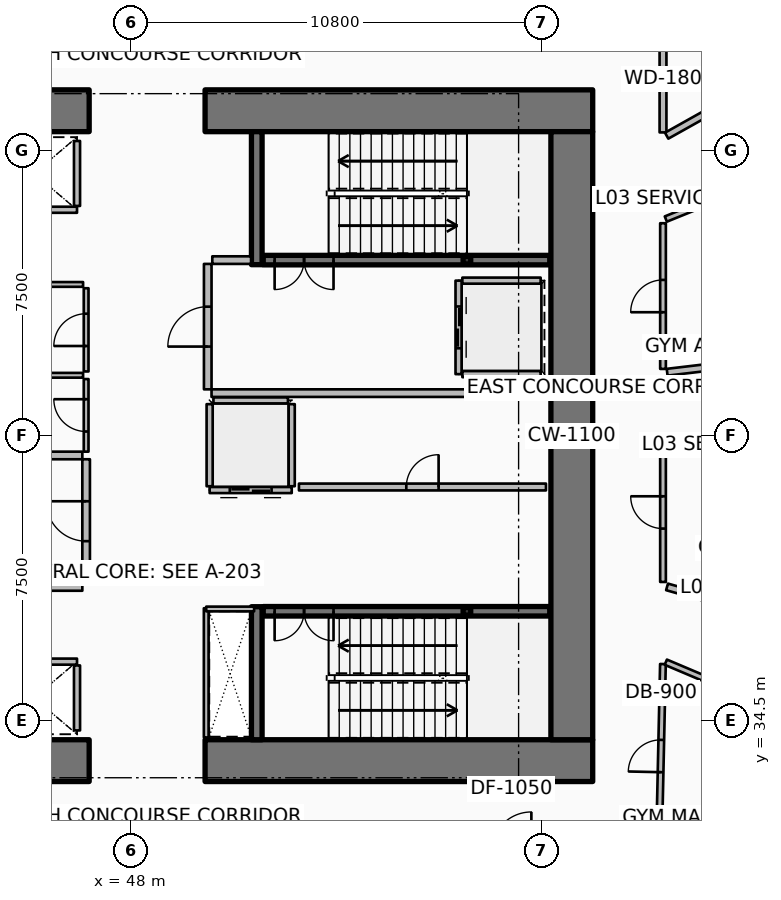
"""IFC4 building model, lengths in metres.
Left out: names, types, materials, properties, quantities, classifications, styles, units other than length and angle.
Written with IfcOpenShell. Run it as: python <this file> out.ifc"""

import sys

from ifc_helpers import new_model, si_unit, direction, frame, frame_2d, origin, origin_2d, place, context, subcontext, project, spatial, rectangle, hollow_rectangle, extrude, element, fill, save


model = new_model("IFC4")
c1 = context("Model", 3, precision=1e-05, world=origin(), true_north=direction((0.0, 1.0)))
c2 = subcontext(c1, "Body", "Model", "MODEL_VIEW")
j1 = project(units=[si_unit("LENGTHUNIT", "METRE"), si_unit("PLANEANGLEUNIT", "RADIAN")], contexts=[c1])
p1 = place(None, origin())
s1 = spatial("IfcSite", under=j1, at=p1, CompositionType="ELEMENT")
p2 = place(p1, origin())
s2 = spatial("IfcBuilding", under=s1, at=p2, CompositionType="ELEMENT")
p3 = place(p2, frame((0.0, 0.0, 16.8)))
s3 = spatial("IfcBuildingStorey", under=s2, at=p3, CompositionType="ELEMENT", Elevation=16.8)
for number, where, z_axis, x_axis in (
    (1, (36.7, 33.45, 0.0), (0.0, 0.0, 1.0), (1.0, 0.0, 0.0)),
    (2, (49.95, 33.45, 0.0), (0.0, 0.0, 1.0), (1.0, 0.0, 0.0)),
    (3, (36.7, 50.55, 0.0), (0.0, 0.0, 1.0), (1.0, 0.0, 0.0)),
    (4, (49.95, 50.55, 0.0), (0.0, 0.0, 1.0), (1.0, 0.0, 0.0)),
):
    element("IfcWall", number, at=place(p3, frame(where, z_axis=z_axis, x_axis=x_axis)), inside=s3, PredefinedType="SHEAR", context=c2, shape_type="SweptSolid", body=[
        extrude(rectangle(XDim=10.2, YDim=1.1, at=frame_2d((5.1, 0.0))), origin(), (0.0, 0.0, 1.0), 4.8),
    ])
p4 = place(p3, frame((59.6, 34.0, 0.0), z_axis=(0.0, 0.0, 1.0), x_axis=(0.0, 1.0, 0.0)))
e5 = element("IfcWall", 5, at=p4, inside=s3, PredefinedType="SHEAR", context=c2, shape_type="SweptSolid", body=[
    extrude(rectangle(XDim=16.0, YDim=1.1, at=frame_2d((8.0, 0.0))), origin(), (0.0, 0.0, 1.0), 4.8),
])
for number, where, z_axis, x_axis in (
    (6, (51.31, 46.5, 0.0), (0.0, 0.0, 1.0), (0.0, 1.0, 0.0)),
    (7, (51.31, 34.0, 0.0), (0.0, 0.0, 1.0), (0.0, 1.0, 0.0)),
):
    element("IfcWall", number, at=place(p3, frame(where, z_axis=z_axis, x_axis=x_axis)), inside=s3, PredefinedType="SHEAR", context=c2, shape_type="SweptSolid", body=[
        extrude(rectangle(XDim=3.5, YDim=0.28, at=frame_2d((1.75, 0.0))), origin(), (0.0, 0.0, 1.0), 4.8),
    ])
for number, where, z_axis, x_axis in (
    (8, (56.84, 46.62, 0.0), (0.0, 0.0, 1.0), (1.0, 0.0, 0.0)),
    (9, (56.84, 37.38, 0.0), (0.0, 0.0, 1.0), (1.0, 0.0, 0.0)),
):
    element("IfcColumn", number, at=place(p3, frame(where, z_axis=z_axis, x_axis=x_axis)), inside=s3, PredefinedType="COLUMN", context=c2, shape_type="SweptSolid", body=[
        extrude(hollow_rectangle(XDim=0.2, YDim=0.2, WallThickness=0.01, InnerFilletRadius=0.01, OuterFilletRadius=0.02, at=origin_2d()), origin(), (0.0, 0.0, 1.0), 2.195),
    ])
p5 = place(p3, frame((51.48, 46.62, 0.0), z_axis=(0.0, 0.0, 1.0), x_axis=(1.0, 0.0, 0.0)))
e10 = element("IfcWall", 10, at=p5, inside=s3, PredefinedType="SOLIDWALL", context=c2, shape_type="SweptSolid", body=[
    extrude(rectangle(XDim=7.54, YDim=0.25, at=frame_2d((3.77, 0.0))), origin(), (0.0, 0.0, 1.0), 4.4),
])
p6 = place(p5, frame((0.3, 0.0, 0.0)))
e11 = element("IfcOpeningElement", 11, at=p6, cuts=e10, PredefinedType="OPENING", context=c2, shape_type="SweptSolid", body=[
    extrude(rectangle(XDim=1.55, YDim=2.15, at=frame_2d((0.775, 1.075))), frame((0.0, 0.135, 0.0), z_axis=(0.0, -1.0, 0.0), x_axis=(1.0, 0.0, 0.0)), (0.0, 0.0, 1.0), 0.27),
])
p7 = place(p3, frame((51.48, 37.38, 0.0), z_axis=(0.0, 0.0, 1.0), x_axis=(1.0, 0.0, 0.0)))
e12 = element("IfcWall", 12, at=p7, inside=s3, PredefinedType="SOLIDWALL", context=c2, shape_type="SweptSolid", body=[
    extrude(rectangle(XDim=7.54, YDim=0.25, at=frame_2d((3.77, 0.0))), origin(), (0.0, 0.0, 1.0), 4.4),
])
p8 = place(p7, frame((0.3, 0.0, 0.0)))
e13 = element("IfcOpeningElement", 13, at=p8, cuts=e12, PredefinedType="OPENING", context=c2, shape_type="SweptSolid", body=[
    extrude(rectangle(XDim=1.55, YDim=2.15, at=frame_2d((0.775, 1.075))), frame((0.0, 0.135, 0.0), z_axis=(0.0, -1.0, 0.0), x_axis=(1.0, 0.0, 0.0)), (0.0, 0.0, 1.0), 0.27),
])
p9 = place(p3, frame((46.58, 47.945, 0.0), z_axis=(0.0, 0.0, 1.0), x_axis=(-1.0, 0.0, 0.0)))
e14 = element("IfcWall", 14, at=p9, inside=s3, PredefinedType="PARTITIONING", context=c2, shape_type="SweptSolid", body=[
    extrude(rectangle(XDim=2.26, YDim=0.16, at=frame_2d((1.13, 0.0))), origin(), (0.0, 0.0, 1.0), 4.4),
])
p10 = place(p3, frame((46.58, 48.045, 0.0), z_axis=(0.0, 0.0, 1.0), x_axis=(0.0, 1.0, 0.0)))
e15 = element("IfcWall", 15, at=p10, inside=s3, PredefinedType="PARTITIONING", context=c2, shape_type="SweptSolid", body=[
    extrude(rectangle(XDim=1.71, YDim=0.16, at=frame_2d((0.855, 0.0))), origin(), (0.0, 0.0, 1.0), 4.4),
])
p11 = place(p3, frame((44.32, 36.055, 0.0), z_axis=(0.0, 0.0, 1.0), x_axis=(1.0, 0.0, 0.0)))
e16 = element("IfcWall", 16, at=p11, inside=s3, PredefinedType="PARTITIONING", context=c2, shape_type="SweptSolid", body=[
    extrude(rectangle(XDim=2.26, YDim=0.16, at=frame_2d((1.13, 0.0))), origin(), (0.0, 0.0, 1.0), 4.4),
])
p12 = place(p3, frame((46.58, 34.245, 0.0), z_axis=(0.0, 0.0, 1.0), x_axis=(0.0, 1.0, 0.0)))
e17 = element("IfcWall", 17, at=p12, inside=s3, PredefinedType="PARTITIONING", context=c2, shape_type="SweptSolid", body=[
    extrude(rectangle(XDim=1.71, YDim=0.16, at=frame_2d((0.855, 0.0))), origin(), (0.0, 0.0, 1.0), 4.4),
])
p13 = place(p3, frame((56.62, 46.08, 0.0), z_axis=(0.0, 0.0, 1.0), x_axis=(0.0, -1.0, 0.0)))
e18 = element("IfcWall", 18, at=p13, inside=s3, PredefinedType="PARTITIONING", context=c2, shape_type="SweptSolid", body=[
    extrude(rectangle(XDim=2.46, YDim=0.16, at=frame_2d((1.23, 0.0))), origin(), (0.0, 0.0, 1.0), 4.4),
])
p14 = place(p13, frame((0.68, 0.0, 0.0)))
e19 = element("IfcOpeningElement", 19, at=p14, cuts=e18, PredefinedType="OPENING", context=c2, shape_type="SweptSolid", body=[
    extrude(rectangle(XDim=1.1, YDim=2.1, at=frame_2d((0.55, 1.05))), frame((0.0, 0.09, 0.0), z_axis=(0.0, -1.0, 0.0), x_axis=(1.0, 0.0, 0.0)), (0.0, 0.0, 1.0), 0.18),
])
for number, where, z_axis, x_axis in (
    (20, (56.72, 46.08, 0.0), (0.0, 0.0, 1.0), (1.0, 0.0, 0.0)),
    (21, (56.72, 43.62, 0.0), (0.0, 0.0, 1.0), (1.0, 0.0, 0.0)),
):
    element("IfcWall", number, at=place(p3, frame(where, z_axis=z_axis, x_axis=x_axis)), inside=s3, PredefinedType="PARTITIONING", context=c2, shape_type="SweptSolid", body=[
        extrude(rectangle(XDim=2.06, YDim=0.16, at=frame_2d((1.03, 0.0))), origin(), (0.0, 0.0, 1.0), 4.4),
    ])
p15 = place(p3, frame((52.23, 40.57, 0.0), z_axis=(0.0, 0.0, 1.0), x_axis=(-1.0, 0.0, 0.0)))
e22 = element("IfcWall", 22, at=p15, inside=s3, PredefinedType="PARTITIONING", context=c2, shape_type="SweptSolid", body=[
    extrude(rectangle(XDim=2.16, YDim=0.16, at=frame_2d((1.08, 0.0))), origin(), (0.0, 0.0, 1.0), 4.4),
])
p16 = place(p15, frame((0.53, 0.0, 0.0)))
e23 = element("IfcOpeningElement", 23, at=p16, cuts=e22, PredefinedType="OPENING", context=c2, shape_type="SweptSolid", body=[
    extrude(rectangle(XDim=1.1, YDim=2.1, at=frame_2d((0.55, 1.05))), frame((0.0, 0.09, 0.0), z_axis=(0.0, -1.0, 0.0), x_axis=(1.0, 0.0, 0.0)), (0.0, 0.0, 1.0), 0.18),
])
for number, where, z_axis, x_axis in (
    (24, (52.23, 40.67, 0.0), (0.0, 0.0, 1.0), (0.0, 1.0, 0.0)),
    (25, (50.07, 40.67, 0.0), (0.0, 0.0, 1.0), (0.0, 1.0, 0.0)),
):
    element("IfcWall", number, at=place(p3, frame(where, z_axis=z_axis, x_axis=x_axis)), inside=s3, PredefinedType="PARTITIONING", context=c2, shape_type="SweptSolid", body=[
        extrude(rectangle(XDim=2.16, YDim=0.16, at=frame_2d((1.08, 0.0))), origin(), (0.0, 0.0, 1.0), 4.4),
    ])
p17 = place(p3, frame((50.17, 42.93, 0.0), z_axis=(0.0, 0.0, 1.0), x_axis=(1.0, 0.0, 0.0)))
e26 = element("IfcWall", 26, at=p17, inside=s3, PredefinedType="PARTITIONING", context=c2, shape_type="SweptSolid", body=[
    extrude(rectangle(XDim=1.96, YDim=0.16, at=frame_2d((0.98, 0.0))), origin(), (0.0, 0.0, 1.0), 4.4),
])
p18 = place(p3, frame((52.42, 40.65, 0.0), z_axis=(0.0, 0.0, 1.0), x_axis=(1.0, 0.0, 0.0)))
e27 = element("IfcWall", 27, at=p18, inside=s3, PredefinedType="PARTITIONING", context=c2, shape_type="SweptSolid", body=[
    extrude(rectangle(XDim=6.5, YDim=0.18, at=frame_2d((3.25, 0.0))), origin(), (0.0, 0.0, 1.0), 4.4),
])
p19 = place(p18, frame((2.825, 0.0, 0.0)))
e28 = element("IfcOpeningElement", 28, at=p19, cuts=e27, PredefinedType="OPENING", context=c2, shape_type="SweptSolid", body=[
    extrude(rectangle(XDim=0.85, YDim=2.06, at=frame_2d((0.425, 1.03))), frame((0.0, 0.1, 0.0), z_axis=(0.0, -1.0, 0.0), x_axis=(1.0, 0.0, 0.0)), (0.0, 0.0, 1.0), 0.2),
])
p20 = place(p3, frame((41.35, 38.02, 0.0), z_axis=(0.0, 0.0, 1.0), x_axis=(1.0, 0.0, 0.0)))
e29 = element("IfcWall", 29, at=p20, inside=s3, PredefinedType="PARTITIONING", context=c2, shape_type="SweptSolid", body=[
    extrude(rectangle(XDim=5.37, YDim=0.2, at=frame_2d((2.685, 0.0))), origin(), (0.0, 0.0, 1.0), 4.4),
])
p21 = place(p3, frame((43.92, 41.48, 0.0), z_axis=(0.0, 0.0, 1.0), x_axis=(1.0, 0.0, 0.0)))
e30 = element("IfcWall", 30, at=p21, inside=s3, PredefinedType="PARTITIONING", context=c2, shape_type="SweptSolid", body=[
    extrude(rectangle(XDim=2.8, YDim=0.2, at=frame_2d((1.4, 0.0))), origin(), (0.0, 0.0, 1.0), 4.4),
])
p22 = place(p3, frame((46.82, 38.12, 0.0), z_axis=(0.0, 0.0, 1.0), x_axis=(0.0, 1.0, 0.0)))
e31 = element("IfcWall", 31, at=p22, inside=s3, PredefinedType="PARTITIONING", context=c2, shape_type="SweptSolid", body=[
    extrude(rectangle(XDim=3.26, YDim=0.2, at=frame_2d((1.63, 0.0))), origin(), (0.0, 0.0, 1.0), 4.4),
])
p23 = place(p22, frame((1.105, 0.0, 0.0)))
e32 = element("IfcOpeningElement", 32, at=p23, cuts=e31, PredefinedType="OPENING", context=c2, shape_type="SweptSolid", body=[
    extrude(rectangle(XDim=1.05, YDim=2.1, at=frame_2d((0.525, 1.05))), frame((0.0, 0.11, 0.0), z_axis=(0.0, -1.0, 0.0), x_axis=(1.0, 0.0, 0.0)), (0.0, 0.0, 1.0), 0.22),
])
p24 = place(p3, frame((50.12, 43.12, 0.0), z_axis=(0.0, 0.0, 1.0), x_axis=(1.0, 0.0, 0.0)))
e33 = element("IfcWall", 33, at=p24, inside=s3, PredefinedType="PARTITIONING", context=c2, shape_type="SweptSolid", body=[
    extrude(rectangle(XDim=8.88, YDim=0.2, at=frame_2d((4.44, 0.0))), origin(), (0.0, 0.0, 1.0), 4.4),
])
p25 = place(p3, frame((50.14, 46.62, 0.0), z_axis=(0.0, 0.0, 1.0), x_axis=(1.0, 0.0, 0.0)))
e34 = element("IfcWall", 34, at=p25, inside=s3, PredefinedType="PARTITIONING", context=c2, shape_type="SweptSolid", body=[
    extrude(rectangle(XDim=1.02, YDim=0.2, at=frame_2d((0.51, 0.0))), origin(), (0.0, 0.0, 1.0), 4.4),
])
p26 = place(p3, frame((50.02, 43.22, 0.0), z_axis=(0.0, 0.0, 1.0), x_axis=(0.0, 1.0, 0.0)))
e35 = element("IfcWall", 35, at=p26, inside=s3, PredefinedType="PARTITIONING", context=c2, shape_type="SweptSolid", body=[
    extrude(rectangle(XDim=3.3, YDim=0.2, at=frame_2d((1.65, 0.0))), origin(), (0.0, 0.0, 1.0), 4.4),
])
p27 = place(p26, frame((1.125, 0.0, 0.0)))
e36 = element("IfcOpeningElement", 36, at=p27, cuts=e35, PredefinedType="OPENING", context=c2, shape_type="SweptSolid", body=[
    extrude(rectangle(XDim=1.05, YDim=2.1, at=frame_2d((0.525, 1.05))), frame((0.0, 0.11, 0.0), z_axis=(0.0, -1.0, 0.0), x_axis=(1.0, 0.0, 0.0)), (0.0, 0.0, 1.0), 0.22),
])
p28 = place(p3, frame((49.98, 34.06, 0.0), z_axis=(0.0, 0.0, 1.0), x_axis=(0.0, 1.0, 0.0)))
e37 = element("IfcWall", 37, at=p28, inside=s3, PredefinedType="PARTITIONING", context=c2, shape_type="SweptSolid", body=[
    extrude(rectangle(XDim=3.4, YDim=0.125, at=frame_2d((1.7, 0.0))), origin(), (0.0, 0.0, 1.0), 3.84),
])
p29 = place(p3, frame((49.98, 37.44, 0.0), z_axis=(0.0, 0.0, 1.0), x_axis=(1.0, 0.0, 0.0)))
e38 = element("IfcWall", 38, at=p29, inside=s3, PredefinedType="PARTITIONING", context=c2, shape_type="SweptSolid", body=[
    extrude(rectangle(XDim=1.26, YDim=0.125, at=frame_2d((0.63, 0.0))), origin(), (0.0, 0.0, 1.0), 3.84),
])
p30 = place(p3, frame((44.03, 43.59, 0.0), z_axis=(0.0, 0.0, 1.0), x_axis=(1.0, 0.0, 0.0)))
e39 = element("IfcWall", 39, at=p30, inside=s3, PredefinedType="PARTITIONING", context=c2, shape_type="SweptSolid", body=[
    extrude(rectangle(XDim=2.71, YDim=0.125, at=frame_2d((1.355, 0.0))), origin(), (0.0, 0.0, 1.0), 3.84),
])
p31 = place(p3, frame((46.82, 41.58, 0.0), z_axis=(0.0, 0.0, 1.0), x_axis=(0.0, 1.0, 0.0)))
e40 = element("IfcWall", 40, at=p31, inside=s3, PredefinedType="PARTITIONING", context=c2, shape_type="SweptSolid", body=[
    extrude(rectangle(XDim=1.91, YDim=0.125, at=frame_2d((0.955, 0.0))), origin(), (0.0, 0.0, 1.0), 3.84),
])
p32 = place(p31, frame((0.53, 0.0, 0.0)))
e41 = element("IfcOpeningElement", 41, at=p32, cuts=e40, PredefinedType="OPENING", context=c2, shape_type="SweptSolid", body=[
    extrude(rectangle(XDim=0.85, YDim=2.06, at=frame_2d((0.425, 1.03))), frame((0.0, 0.073, 0.0), z_axis=(0.0, -1.0, 0.0), x_axis=(1.0, 0.0, 0.0)), (0.0, 0.0, 1.0), 0.145),
])
p33 = place(p3, frame((46.82, 43.69, 0.0), z_axis=(0.0, 0.0, 1.0), x_axis=(0.0, 1.0, 0.0)))
e42 = element("IfcWall", 42, at=p33, inside=s3, PredefinedType="PARTITIONING", context=c2, shape_type="SweptSolid", body=[
    extrude(rectangle(XDim=2.19, YDim=0.125, at=frame_2d((1.095, 0.0))), origin(), (0.0, 0.0, 1.0), 3.84),
])
p34 = place(p33, frame((0.67, 0.0, 0.0)))
e43 = element("IfcOpeningElement", 43, at=p34, cuts=e42, PredefinedType="OPENING", context=c2, shape_type="SweptSolid", body=[
    extrude(rectangle(XDim=0.85, YDim=2.06, at=frame_2d((0.425, 1.03))), frame((0.0, 0.073, 0.0), z_axis=(0.0, -1.0, 0.0), x_axis=(1.0, 0.0, 0.0)), (0.0, 0.0, 1.0), 0.145),
])
p35 = place(p3, frame((45.48, 45.98, 0.0), z_axis=(0.0, 0.0, 1.0), x_axis=(1.0, 0.0, 0.0)))
e44 = element("IfcWall", 44, at=p35, inside=s3, PredefinedType="PARTITIONING", context=c2, shape_type="SweptSolid", body=[
    extrude(rectangle(XDim=1.26, YDim=0.125, at=frame_2d((0.63, 0.0))), origin(), (0.0, 0.0, 1.0), 3.84),
])
p36 = place(p3, frame((62.0, 49.98, 0.0), z_axis=(0.0, 0.0, 1.0), x_axis=(0.0, 1.0, 0.0)))
e45 = element("IfcWall", 45, at=p36, inside=s3, PredefinedType="PARTITIONING", context=c2, shape_type="SweptSolid", body=[
    extrude(rectangle(XDim=2.83, YDim=0.18, at=frame_2d((1.415, 0.0))), origin(), (0.0, 0.0, 1.0), 3.613),
])
p37 = place(p3, frame((62.096, 49.894, 0.0), z_axis=(0.0, 0.0, 1.0), x_axis=(0.872490608205, 0.488630881744, 0.0)))
e46 = element("IfcWall", 46, at=p37, inside=s3, PredefinedType="PARTITIONING", context=c2, shape_type="SweptSolid", body=[
    extrude(rectangle(XDim=19.185, YDim=0.18, at=frame_2d((9.592, 0.0))), origin(), (0.0, 0.0, 1.0), 3.613),
])
p38 = place(p3, frame((61.892, 31.15, 0.0), z_axis=(0.0, 0.0, 1.0), x_axis=(0.021928973177, 0.999759531155, 0.0)))
e47 = element("IfcWall", 47, at=p38, inside=s3, PredefinedType="PARTITIONING", context=c2, shape_type="SweptSolid", body=[
    extrude(rectangle(XDim=4.843, YDim=0.15, at=frame_2d((2.421, 0.0))), origin(), (0.0, 0.0, 1.0), 3.613),
])
p39 = place(p38, frame((1.997, 0.0, 0.0)))
e48 = element("IfcOpeningElement", 48, at=p39, cuts=e47, PredefinedType="OPENING", context=c2, shape_type="SweptSolid", body=[
    extrude(rectangle(XDim=0.85, YDim=2.06, at=frame_2d((0.425, 1.03))), frame((0.0, 0.085, 0.0), z_axis=(0.0, -1.0, 0.0), x_axis=(1.0, 0.0, 0.0)), (0.0, 0.0, 1.0), 0.17),
])
p40 = place(p3, frame((62.074, 36.041, 0.0), z_axis=(0.0, 0.0, 1.0), x_axis=(0.920841540816, -0.38993699069, 0.0)))
e49 = element("IfcWall", 49, at=p40, inside=s3, PredefinedType="PARTITIONING", context=c2, shape_type="SweptSolid", body=[
    extrude(rectangle(XDim=5.443, YDim=0.15, at=frame_2d((2.722, 0.0))), origin(), (0.0, 0.0, 1.0), 3.84),
])
p41 = place(p3, frame((62.106, 38.022, 0.0), z_axis=(0.0, 0.0, 1.0), x_axis=(0.962455233657, -0.271440459782, 0.0)))
e50 = element("IfcWall", 50, at=p41, inside=s3, PredefinedType="PARTITIONING", context=c2, shape_type="SweptSolid", body=[
    extrude(rectangle(XDim=19.716, YDim=0.18, at=frame_2d((9.858, 0.0))), origin(), (0.0, 0.0, 1.0), 3.613),
])
p42 = place(p3, frame((62.0, 38.152, 0.0), z_axis=(0.0, 0.0, 1.0), x_axis=(0.0, 1.0, 0.0)))
e51 = element("IfcWall", 51, at=p42, inside=s3, PredefinedType="PARTITIONING", context=c2, shape_type="SweptSolid", body=[
    extrude(rectangle(XDim=3.658, YDim=0.15, at=frame_2d((1.829, 0.0))), origin(), (0.0, 0.0, 1.0), 3.613),
])
p43 = place(p42, frame((1.404, 0.0, 0.0)))
e52 = element("IfcOpeningElement", 52, at=p43, cuts=e51, PredefinedType="OPENING", context=c2, shape_type="SweptSolid", body=[
    extrude(rectangle(XDim=0.85, YDim=2.06, at=frame_2d((0.425, 1.03))), frame((0.0, 0.085, 0.0), z_axis=(0.0, -1.0, 0.0), x_axis=(1.0, 0.0, 0.0)), (0.0, 0.0, 1.0), 0.17),
])
p44 = place(p3, frame((62.08, 41.889, 0.0), z_axis=(0.0, 0.0, 1.0), x_axis=(0.999969031596, -0.007869933178, 0.0)))
e53 = element("IfcWall", 53, at=p44, inside=s3, PredefinedType="PARTITIONING", context=c2, shape_type="SweptSolid", body=[
    extrude(rectangle(XDim=3.505, YDim=0.15, at=frame_2d((1.753, 0.0))), origin(), (0.0, 0.0, 1.0), 3.84),
])
p45 = place(p3, frame((62.109, 43.67, 0.0), z_axis=(0.0, 0.0, 1.0), x_axis=(0.993068665713, 0.117535633659, 0.0)))
e54 = element("IfcWall", 54, at=p45, inside=s3, PredefinedType="PARTITIONING", context=c2, shape_type="SweptSolid", body=[
    extrude(rectangle(XDim=21.133, YDim=0.18, at=frame_2d((10.566, 0.0))), origin(), (0.0, 0.0, 1.0), 3.613),
])
p46 = place(p3, frame((62.0, 43.757, 0.0), z_axis=(0.0, 0.0, 1.0), x_axis=(0.0, 1.0, 0.0)))
e55 = element("IfcWall", 55, at=p46, inside=s3, PredefinedType="PARTITIONING", context=c2, shape_type="SweptSolid", body=[
    extrude(rectangle(XDim=3.833, YDim=0.15, at=frame_2d((1.917, 0.0))), origin(), (0.0, 0.0, 1.0), 3.613),
])
p47 = place(p46, frame((1.492, 0.0, 0.0)))
e56 = element("IfcOpeningElement", 56, at=p47, cuts=e55, PredefinedType="OPENING", context=c2, shape_type="SweptSolid", body=[
    extrude(rectangle(XDim=0.85, YDim=2.06, at=frame_2d((0.425, 1.03))), frame((0.0, 0.085, 0.0), z_axis=(0.0, -1.0, 0.0), x_axis=(1.0, 0.0, 0.0)), (0.0, 0.0, 1.0), 0.17),
])
p48 = place(p3, frame((62.074, 47.701, 0.0), z_axis=(0.0, 0.0, 1.0), x_axis=(0.926852538468, 0.375425587747, 0.0)))
e57 = element("IfcWall", 57, at=p48, inside=s3, PredefinedType="PARTITIONING", context=c2, shape_type="SweptSolid", body=[
    extrude(rectangle(XDim=2.96, YDim=0.15, at=frame_2d((1.48, 0.0))), origin(), (0.0, 0.0, 1.0), 3.84),
])
p49 = place(p6, origin())
e58 = element("IfcDoor", 58, at=p49, inside=s3, OperationType="DOUBLE_DOOR_SINGLE_SWING", PredefinedType="DOOR", context=c2, shape_type="SweptSolid", body=[
    extrude(rectangle(XDim=1.55, YDim=2.15, at=frame_2d((0.775, 1.075))), frame((0.0, 0.025, 0.0), z_axis=(0.0, -1.0, 0.0), x_axis=(1.0, 0.0, 0.0)), (0.0, 0.0, 1.0), 0.05),
])
fill(e11, e58)
p50 = place(p8, origin())
e59 = element("IfcDoor", 59, at=p50, inside=s3, OperationType="DOUBLE_DOOR_SINGLE_SWING", PredefinedType="DOOR", context=c2, shape_type="SweptSolid", body=[
    extrude(rectangle(XDim=1.55, YDim=2.15, at=frame_2d((0.775, 1.075))), frame((0.0, 0.025, 0.0), z_axis=(0.0, -1.0, 0.0), x_axis=(1.0, 0.0, 0.0)), (0.0, 0.0, 1.0), 0.05),
])
fill(e13, e59)
p51 = place(p14, origin())
e60 = element("IfcDoor", 60, at=p51, inside=s3, OperationType="DOUBLE_DOOR_SLIDING", PredefinedType="DOOR", context=c2, shape_type="SweptSolid", body=[
    extrude(rectangle(XDim=1.1, YDim=2.1, at=frame_2d((0.55, 1.05))), frame((0.0, 0.025, 0.0), z_axis=(0.0, -1.0, 0.0), x_axis=(1.0, 0.0, 0.0)), (0.0, 0.0, 1.0), 0.05),
])
fill(e19, e60)
p52 = place(p16, origin())
e61 = element("IfcDoor", 61, at=p52, inside=s3, OperationType="DOUBLE_DOOR_SLIDING", PredefinedType="DOOR", context=c2, shape_type="SweptSolid", body=[
    extrude(rectangle(XDim=1.1, YDim=2.1, at=frame_2d((0.55, 1.05))), frame((0.0, 0.025, 0.0), z_axis=(0.0, -1.0, 0.0), x_axis=(1.0, 0.0, 0.0)), (0.0, 0.0, 1.0), 0.05),
])
fill(e23, e61)
p53 = place(p19, origin())
e62 = element("IfcDoor", 62, at=p53, inside=s3, OperationType="SINGLE_SWING_RIGHT", PredefinedType="DOOR", context=c2, shape_type="SweptSolid", body=[
    extrude(rectangle(XDim=0.85, YDim=2.06, at=frame_2d((0.425, 1.03))), frame((0.0, 0.025, 0.0), z_axis=(0.0, -1.0, 0.0), x_axis=(1.0, 0.0, 0.0)), (0.0, 0.0, 1.0), 0.05),
])
fill(e28, e62)
p54 = place(p23, origin())
e63 = element("IfcDoor", 63, at=p54, inside=s3, OperationType="SINGLE_SWING_RIGHT", PredefinedType="DOOR", context=c2, shape_type="SweptSolid", body=[
    extrude(rectangle(XDim=1.05, YDim=2.1, at=frame_2d((0.525, 1.05))), frame((0.0, 0.025, 0.0), z_axis=(0.0, -1.0, 0.0), x_axis=(1.0, 0.0, 0.0)), (0.0, 0.0, 1.0), 0.05),
])
fill(e32, e63)
p55 = place(p27, origin())
e64 = element("IfcDoor", 64, at=p55, inside=s3, OperationType="SINGLE_SWING_LEFT", PredefinedType="DOOR", context=c2, shape_type="SweptSolid", body=[
    extrude(rectangle(XDim=1.05, YDim=2.1, at=frame_2d((0.525, 1.05))), frame((0.0, 0.025, 0.0), z_axis=(0.0, -1.0, 0.0), x_axis=(1.0, 0.0, 0.0)), (0.0, 0.0, 1.0), 0.05),
])
fill(e36, e64)
p56 = place(p32, origin())
e65 = element("IfcDoor", 65, at=p56, inside=s3, OperationType="SINGLE_SWING_RIGHT", PredefinedType="DOOR", context=c2, shape_type="SweptSolid", body=[
    extrude(rectangle(XDim=0.85, YDim=2.06, at=frame_2d((0.425, 1.03))), frame((0.0, 0.025, 0.0), z_axis=(0.0, -1.0, 0.0), x_axis=(1.0, 0.0, 0.0)), (0.0, 0.0, 1.0), 0.05),
])
fill(e41, e65)
p57 = place(p34, origin())
e66 = element("IfcDoor", 66, at=p57, inside=s3, OperationType="SINGLE_SWING_LEFT", PredefinedType="DOOR", context=c2, shape_type="SweptSolid", body=[
    extrude(rectangle(XDim=0.85, YDim=2.06, at=frame_2d((0.425, 1.03))), frame((0.0, 0.025, 0.0), z_axis=(0.0, -1.0, 0.0), x_axis=(1.0, 0.0, 0.0)), (0.0, 0.0, 1.0), 0.05),
])
fill(e43, e66)
p58 = place(p39, origin())
e67 = element("IfcDoor", 67, at=p58, inside=s3, OperationType="SINGLE_SWING_LEFT", PredefinedType="DOOR", context=c2, shape_type="SweptSolid", body=[
    extrude(rectangle(XDim=0.85, YDim=2.06, at=frame_2d((0.425, 1.03))), frame((0.0, 0.025, 0.0), z_axis=(0.0, -1.0, 0.0), x_axis=(1.0, 0.0, 0.0)), (0.0, 0.0, 1.0), 0.05),
])
fill(e48, e67)
p59 = place(p43, origin())
e68 = element("IfcDoor", 68, at=p59, inside=s3, OperationType="SINGLE_SWING_RIGHT", PredefinedType="DOOR", context=c2, shape_type="SweptSolid", body=[
    extrude(rectangle(XDim=0.85, YDim=2.06, at=frame_2d((0.425, 1.03))), frame((0.0, 0.025, 0.0), z_axis=(0.0, -1.0, 0.0), x_axis=(1.0, 0.0, 0.0)), (0.0, 0.0, 1.0), 0.05),
])
fill(e52, e68)
p60 = place(p47, origin())
e69 = element("IfcDoor", 69, at=p60, inside=s3, OperationType="SINGLE_SWING_LEFT", PredefinedType="DOOR", context=c2, shape_type="SweptSolid", body=[
    extrude(rectangle(XDim=0.85, YDim=2.06, at=frame_2d((0.425, 1.03))), frame((0.0, 0.025, 0.0), z_axis=(0.0, -1.0, 0.0), x_axis=(1.0, 0.0, 0.0)), (0.0, 0.0, 1.0), 0.05),
])
fill(e56, e69)
save(model, sys.argv[1])
